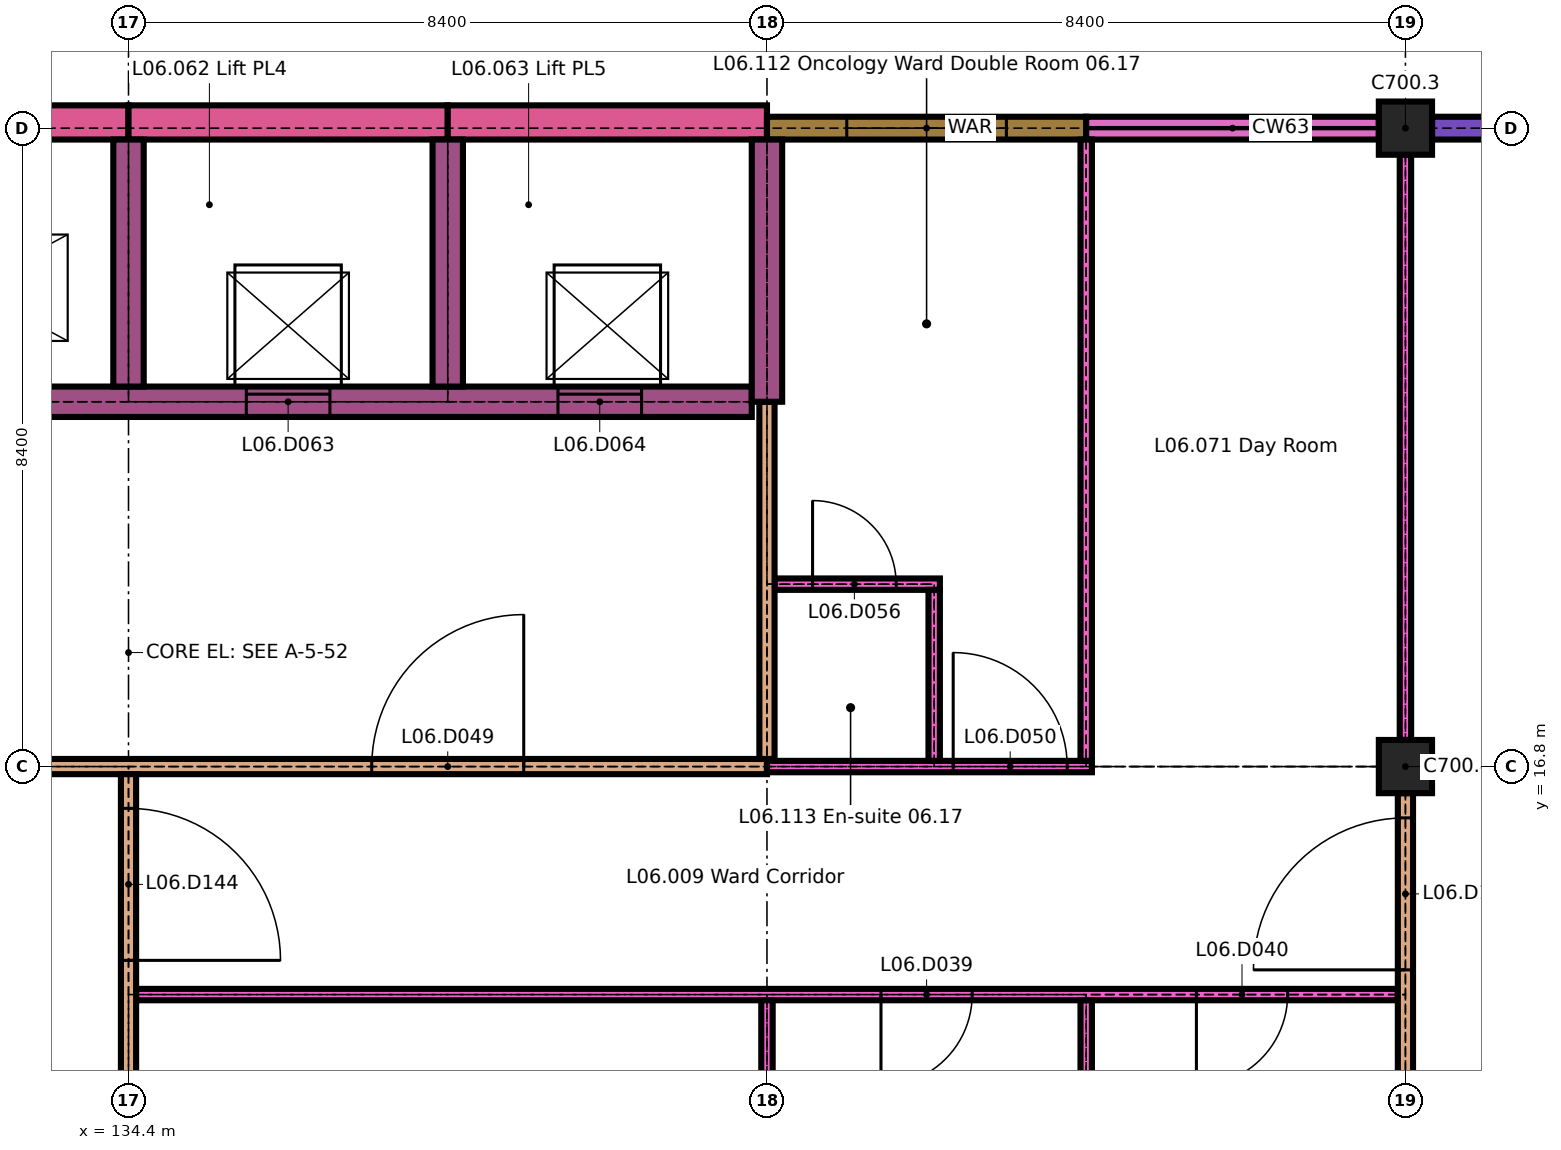
"""IFC4 building model, lengths in metres.
Left out: names, types, materials, properties, quantities, classifications, styles, units other than length and angle.
Written with IfcOpenShell. Run it as: python <this file> out.ifc"""

import sys

from ifc_helpers import new_model, si_unit, direction, frame, frame_2d, origin, origin_2d, place, context, subcontext, project, spatial, rectangle, extrude, element, fill, save


model = new_model("IFC4")
c1 = context("Model", 3, precision=1e-05, world=origin(), true_north=direction((0.0, 1.0)))
c2 = subcontext(c1, "Body", "Model", "MODEL_VIEW")
j1 = project(units=[si_unit("LENGTHUNIT", "METRE"), si_unit("PLANEANGLEUNIT", "RADIAN")], contexts=[c1])
p1 = place(None, origin())
s1 = spatial("IfcSite", under=j1, at=p1, CompositionType="ELEMENT")
p2 = place(p1, origin())
s2 = spatial("IfcBuilding", under=s1, at=p2, CompositionType="ELEMENT")
p3 = place(p2, frame((0.0, 0.0, 26.1)))
s3 = spatial("IfcBuildingStorey", under=s2, at=p3, CompositionType="ELEMENT", Elevation=26.1)
p4 = place(p3, frame((151.2, 16.8, 0.0), z_axis=(0.0, 0.0, 1.0), x_axis=(1.0, 0.0, 0.0)))
e1 = element("IfcColumn", 1, at=p4, inside=s3, PredefinedType="COLUMN", context=c2, shape_type="SweptSolid", body=[
    extrude(rectangle(XDim=0.7, YDim=0.7, at=origin_2d()), origin(), (0.0, 0.0, 1.0), 3.3),
])
p5 = place(p3, frame((151.2, 25.2, 0.0), z_axis=(0.0, 0.0, 1.0), x_axis=(1.0, 0.0, 0.0)))
e2 = element("IfcColumn", 2, at=p5, inside=s3, PredefinedType="COLUMN", context=c2, shape_type="SweptSolid", body=[
    extrude(rectangle(XDim=0.7, YDim=0.7, at=origin_2d()), origin(), (0.0, 0.0, 1.0), 3.2),
])
p6 = place(p3, frame((130.2, 25.275, 0.0), z_axis=(0.0, 0.0, 1.0), x_axis=(1.0, 0.0, 0.0)))
e3 = element("IfcWall", 3, at=p6, inside=s3, PredefinedType="SOLIDWALL", context=c2, shape_type="SweptSolid", body=[
    extrude(rectangle(XDim=4.2, YDim=0.45, at=frame_2d((2.1, 0.0))), origin(), (0.0, 0.0, 1.0), 3.3),
])
p7 = place(p3, frame((134.4, 25.275, 0.0), z_axis=(0.0, 0.0, 1.0), x_axis=(1.0, 0.0, 0.0)))
e4 = element("IfcWall", 4, at=p7, inside=s3, PredefinedType="SOLIDWALL", context=c2, shape_type="SweptSolid", body=[
    extrude(rectangle(XDim=4.2, YDim=0.45, at=frame_2d((2.1, 0.0))), origin(), (0.0, 0.0, 1.0), 3.3),
])
p8 = place(p3, frame((138.6, 25.275, 0.0), z_axis=(0.0, 0.0, 1.0), x_axis=(1.0, 0.0, 0.0)))
e5 = element("IfcWall", 5, at=p8, inside=s3, PredefinedType="SOLIDWALL", context=c2, shape_type="SweptSolid", body=[
    extrude(rectangle(XDim=4.2, YDim=0.45, at=frame_2d((2.1, 0.0))), origin(), (0.0, 0.0, 1.0), 3.3),
])
p9 = place(p3, frame((142.8, 25.2, 0.0), z_axis=(0.0, 0.0, 1.0), x_axis=(1.0, 0.0, 0.0)))
e6 = element("IfcWall", 6, at=p9, inside=s3, PredefinedType="SOLIDWALL", context=c2, shape_type="SweptSolid", body=[
    extrude(rectangle(XDim=4.2, YDim=0.3, at=frame_2d((2.1, 0.0))), origin(), (0.0, 0.0, 1.0), 2.9),
])
p10 = place(p9, frame((1.05, 0.0, 0.9)))
e7 = element("IfcOpeningElement", 7, at=p10, cuts=e6, PredefinedType="OPENING", context=c2, shape_type="SweptSolid", body=[
    extrude(rectangle(XDim=2.1, YDim=1.5, at=frame_2d((1.05, 0.75))), frame((0.0, 0.16, 0.0), z_axis=(0.0, -1.0, 0.0), x_axis=(1.0, 0.0, 0.0)), (0.0, 0.0, 1.0), 0.32),
])
p11 = place(p3, frame((147.0, 25.2, 0.0), z_axis=(0.0, 0.0, 1.0), x_axis=(1.0, 0.0, 0.0)))
e8 = element("IfcWall", 8, at=p11, inside=s3, PredefinedType="SOLIDWALL", context=c2, shape_type="SweptSolid", body=[
    extrude(rectangle(XDim=3.85, YDim=0.3, at=frame_2d((1.925, 0.0))), origin(), (0.0, 0.0, 1.0), 0.6),
])
p12 = place(p3, frame((151.55, 25.2, 0.0), z_axis=(0.0, 0.0, 1.0), x_axis=(1.0, 0.0, 0.0)))
e9 = element("IfcWall", 9, at=p12, inside=s3, PredefinedType="SOLIDWALL", context=c2, shape_type="SweptSolid", body=[
    extrude(rectangle(XDim=1.1, YDim=0.3, at=frame_2d((0.55, 0.0))), origin(), (0.0, 0.0, 1.0), 3.3),
])
p13 = place(p3, frame((134.5, 13.8, 0.0), z_axis=(0.0, 0.0, 1.0), x_axis=(1.0, 0.0, 0.0)))
e10 = element("IfcWall", 10, at=p13, inside=s3, PredefinedType="PARTITIONING", context=c2, shape_type="SweptSolid", body=[
    extrude(rectangle(XDim=16.6, YDim=0.15, at=frame_2d((8.3, 0.0))), origin(), (0.0, 0.0, 1.0), 3.3),
])
p14 = place(p13, frame((9.8, 0.0, 0.0)))
e11 = element("IfcOpeningElement", 11, at=p14, cuts=e10, PredefinedType="OPENING", context=c2, shape_type="SweptSolid", body=[
    extrude(rectangle(XDim=1.2, YDim=2.1, at=frame_2d((0.6, 1.05))), frame((0.0, 0.085, 0.0), z_axis=(0.0, -1.0, 0.0), x_axis=(1.0, 0.0, 0.0)), (0.0, 0.0, 1.0), 0.17),
])
p15 = place(p13, frame((13.95, 0.0, 0.0)))
e12 = element("IfcOpeningElement", 12, at=p15, cuts=e10, PredefinedType="OPENING", context=c2, shape_type="SweptSolid", body=[
    extrude(rectangle(XDim=1.2, YDim=2.1, at=frame_2d((0.6, 1.05))), frame((0.0, 0.085, 0.0), z_axis=(0.0, -1.0, 0.0), x_axis=(1.0, 0.0, 0.0)), (0.0, 0.0, 1.0), 0.17),
])
p16 = place(p3, frame((117.5, 16.8, 0.0), z_axis=(0.0, 0.0, 1.0), x_axis=(1.0, 0.0, 0.0)))
e13 = element("IfcWall", 13, at=p16, inside=s3, PredefinedType="PARTITIONING", context=c2, shape_type="SweptSolid", body=[
    extrude(rectangle(XDim=25.3, YDim=0.2, at=frame_2d((12.65, 0.0))), origin(), (0.0, 0.0, 1.0), 3.3),
])
p17 = place(p16, frame((3.3, 0.0, 0.0)))
e14 = element("IfcOpeningElement", 14, at=p17, cuts=e13, PredefinedType="OPENING", context=c2, shape_type="SweptSolid", body=[
    extrude(rectangle(XDim=2.0, YDim=2.4, at=frame_2d((1.0, 1.2))), frame((0.0, 0.11, 0.0), z_axis=(0.0, -1.0, 0.0), x_axis=(1.0, 0.0, 0.0)), (0.0, 0.0, 1.0), 0.22),
])
p18 = place(p16, frame((20.1, 0.0, 0.0)))
e15 = element("IfcOpeningElement", 15, at=p18, cuts=e13, PredefinedType="OPENING", context=c2, shape_type="SweptSolid", body=[
    extrude(rectangle(XDim=2.0, YDim=2.4, at=frame_2d((1.0, 1.2))), frame((0.0, 0.11, 0.0), z_axis=(0.0, -1.0, 0.0), x_axis=(1.0, 0.0, 0.0)), (0.0, 0.0, 1.0), 0.22),
])
p19 = place(p3, frame((142.8, 16.8, 0.0), z_axis=(0.0, 0.0, 1.0), x_axis=(1.0, 0.0, 0.0)))
e16 = element("IfcWall", 16, at=p19, inside=s3, PredefinedType="PARTITIONING", context=c2, shape_type="SweptSolid", body=[
    extrude(rectangle(XDim=4.275, YDim=0.15, at=frame_2d((2.137, 0.0))), origin(), (0.0, 0.0, 1.0), 3.3),
])
p20 = place(p19, frame((2.45, 0.0, 0.0)))
e17 = element("IfcOpeningElement", 17, at=p20, cuts=e16, PredefinedType="OPENING", context=c2, shape_type="SweptSolid", body=[
    extrude(rectangle(XDim=1.5, YDim=2.4, at=frame_2d((0.75, 1.2))), frame((0.0, 0.085, 0.0), z_axis=(0.0, -1.0, 0.0), x_axis=(1.0, 0.0, 0.0)), (0.0, 0.0, 1.0), 0.17),
])
p21 = place(p3, frame((142.9, 19.2, 0.0), z_axis=(0.0, 0.0, 1.0), x_axis=(1.0, 0.0, 0.0)))
e18 = element("IfcWall", 18, at=p21, inside=s3, PredefinedType="PARTITIONING", context=c2, shape_type="SweptSolid", body=[
    extrude(rectangle(XDim=2.175, YDim=0.15, at=frame_2d((1.087, 0.0))), origin(), (0.0, 0.0, 1.0), 3.3),
])
p22 = place(p21, frame((0.5, 0.0, 0.0)))
e19 = element("IfcOpeningElement", 19, at=p22, cuts=e18, PredefinedType="OPENING", context=c2, shape_type="SweptSolid", body=[
    extrude(rectangle(XDim=1.1, YDim=2.1, at=frame_2d((0.55, 1.05))), frame((0.0, 0.085, 0.0), z_axis=(0.0, -1.0, 0.0), x_axis=(1.0, 0.0, 0.0)), (0.0, 0.0, 1.0), 0.17),
])
p23 = place(p3, frame((117.8, 21.6, 0.0), z_axis=(0.0, 0.0, 1.0), x_axis=(1.0, 0.0, 0.0)))
e20 = element("IfcWall", 20, at=p23, inside=s3, PredefinedType="SHEAR", context=c2, shape_type="SweptSolid", body=[
    extrude(rectangle(XDim=24.8, YDim=0.4, at=frame_2d((12.4, 0.0))), origin(), (0.0, 0.0, 1.0), 3.3),
])
p24 = place(p23, frame((1.35, 0.0, 0.0)))
e21 = element("IfcOpeningElement", 21, at=p24, cuts=e20, PredefinedType="OPENING", context=c2, shape_type="SweptSolid", body=[
    extrude(rectangle(XDim=1.3, YDim=2.1, at=frame_2d((0.65, 1.05))), frame((0.0, 0.21, 0.0), z_axis=(0.0, -1.0, 0.0), x_axis=(1.0, 0.0, 0.0)), (0.0, 0.0, 1.0), 0.42),
])
p25 = place(p23, frame((5.45, 0.0, 0.0)))
e22 = element("IfcOpeningElement", 22, at=p25, cuts=e20, PredefinedType="OPENING", context=c2, shape_type="SweptSolid", body=[
    extrude(rectangle(XDim=1.3, YDim=2.1, at=frame_2d((0.65, 1.05))), frame((0.0, 0.21, 0.0), z_axis=(0.0, -1.0, 0.0), x_axis=(1.0, 0.0, 0.0)), (0.0, 0.0, 1.0), 0.42),
])
p26 = place(p23, frame((9.65, 0.0, 0.0)))
e23 = element("IfcOpeningElement", 23, at=p26, cuts=e20, PredefinedType="OPENING", context=c2, shape_type="SweptSolid", body=[
    extrude(rectangle(XDim=1.3, YDim=2.1, at=frame_2d((0.65, 1.05))), frame((0.0, 0.21, 0.0), z_axis=(0.0, -1.0, 0.0), x_axis=(1.0, 0.0, 0.0)), (0.0, 0.0, 1.0), 0.42),
])
p27 = place(p23, frame((13.85, 0.0, 0.0)))
e24 = element("IfcOpeningElement", 24, at=p27, cuts=e20, PredefinedType="OPENING", context=c2, shape_type="SweptSolid", body=[
    extrude(rectangle(XDim=1.3, YDim=2.1, at=frame_2d((0.65, 1.05))), frame((0.0, 0.21, 0.0), z_axis=(0.0, -1.0, 0.0), x_axis=(1.0, 0.0, 0.0)), (0.0, 0.0, 1.0), 0.42),
])
p28 = place(p23, frame((18.15, 0.0, 0.0)))
e25 = element("IfcOpeningElement", 25, at=p28, cuts=e20, PredefinedType="OPENING", context=c2, shape_type="SweptSolid", body=[
    extrude(rectangle(XDim=1.1, YDim=2.1, at=frame_2d((0.55, 1.05))), frame((0.0, 0.21, 0.0), z_axis=(0.0, -1.0, 0.0), x_axis=(1.0, 0.0, 0.0)), (0.0, 0.0, 1.0), 0.42),
])
p29 = place(p23, frame((22.25, 0.0, 0.0)))
e26 = element("IfcOpeningElement", 26, at=p29, cuts=e20, PredefinedType="OPENING", context=c2, shape_type="SweptSolid", body=[
    extrude(rectangle(XDim=1.1, YDim=2.1, at=frame_2d((0.55, 1.05))), frame((0.0, 0.21, 0.0), z_axis=(0.0, -1.0, 0.0), x_axis=(1.0, 0.0, 0.0)), (0.0, 0.0, 1.0), 0.42),
])
p30 = place(p3, frame((134.4, 3.6, 0.0), z_axis=(0.0, 0.0, 1.0), x_axis=(0.0, 1.0, 0.0)))
e27 = element("IfcWall", 27, at=p30, inside=s3, PredefinedType="PARTITIONING", context=c2, shape_type="SweptSolid", body=[
    extrude(rectangle(XDim=13.1, YDim=0.2, at=frame_2d((6.55, 0.0))), origin(), (0.0, 0.0, 1.0), 3.3),
])
p31 = place(p30, frame((5.3, 0.0, 0.0)))
e28 = element("IfcOpeningElement", 28, at=p31, cuts=e27, PredefinedType="OPENING", context=c2, shape_type="SweptSolid", body=[
    extrude(rectangle(XDim=2.0, YDim=2.4, at=frame_2d((1.0, 1.2))), frame((0.0, 0.11, 0.0), z_axis=(0.0, -1.0, 0.0), x_axis=(1.0, 0.0, 0.0)), (0.0, 0.0, 1.0), 0.22),
])
p32 = place(p30, frame((10.65, 0.0, 0.0)))
e29 = element("IfcOpeningElement", 29, at=p32, cuts=e27, PredefinedType="OPENING", context=c2, shape_type="SweptSolid", body=[
    extrude(rectangle(XDim=2.0, YDim=2.4, at=frame_2d((1.0, 1.2))), frame((0.0, 0.11, 0.0), z_axis=(0.0, -1.0, 0.0), x_axis=(1.0, 0.0, 0.0)), (0.0, 0.0, 1.0), 0.22),
])
for number, where, z_axis, x_axis in (
    (30, (134.4, 21.8, 0.0), (0.0, 0.0, 1.0), (0.0, 1.0, 0.0)),
    (31, (138.6, 21.8, 0.0), (0.0, 0.0, 1.0), (0.0, 1.0, 0.0)),
):
    element("IfcWall", number, at=place(p3, frame(where, z_axis=z_axis, x_axis=x_axis)), inside=s3, PredefinedType="SHEAR", context=c2, shape_type="SweptSolid", body=[
        extrude(rectangle(XDim=3.25, YDim=0.4, at=frame_2d((1.625, 0.0))), origin(), (0.0, 0.0, 1.0), 3.3),
    ])
p33 = place(p3, frame((142.8, 11.475, 0.0), z_axis=(0.0, 0.0, 1.0), x_axis=(0.0, 1.0, 0.0)))
e32 = element("IfcWall", 32, at=p33, inside=s3, PredefinedType="PARTITIONING", context=c2, shape_type="SweptSolid", body=[
    extrude(rectangle(XDim=2.25, YDim=0.15, at=frame_2d((1.125, 0.0))), origin(), (0.0, 0.0, 1.0), 3.3),
])
p34 = place(p3, frame((142.8, 16.9, 0.0), z_axis=(0.0, 0.0, 1.0), x_axis=(0.0, 1.0, 0.0)))
e33 = element("IfcWall", 33, at=p34, inside=s3, PredefinedType="PARTITIONING", context=c2, shape_type="SweptSolid", body=[
    extrude(rectangle(XDim=4.7, YDim=0.2, at=frame_2d((2.35, 0.0))), origin(), (0.0, 0.0, 1.0), 3.3),
])
p35 = place(p3, frame((142.8, 21.6, 0.0), z_axis=(0.0, 0.0, 1.0), x_axis=(0.0, 1.0, 0.0)))
e34 = element("IfcWall", 34, at=p35, inside=s3, PredefinedType="SHEAR", context=c2, shape_type="SweptSolid", body=[
    extrude(rectangle(XDim=3.45, YDim=0.4, at=frame_2d((1.725, 0.0))), origin(), (0.0, 0.0, 1.0), 3.3),
])
for number, where, z_axis, x_axis in (
    (35, (145.0, 16.875, 0.0), (0.0, 0.0, 1.0), (0.0, 1.0, 0.0)),
    (36, (147.0, 11.475, 0.0), (0.0, 0.0, 1.0), (0.0, 1.0, 0.0)),
):
    element("IfcWall", number, at=place(p3, frame(where, z_axis=z_axis, x_axis=x_axis)), inside=s3, PredefinedType="PARTITIONING", context=c2, shape_type="SweptSolid", body=[
        extrude(rectangle(XDim=2.25, YDim=0.15, at=frame_2d((1.125, 0.0))), origin(), (0.0, 0.0, 1.0), 3.3),
    ])
p36 = place(p3, frame((147.0, 16.875, 0.0), z_axis=(0.0, 0.0, 1.0), x_axis=(0.0, 1.0, 0.0)))
e37 = element("IfcWall", 37, at=p36, inside=s3, PredefinedType="PARTITIONING", context=c2, shape_type="SweptSolid", body=[
    extrude(rectangle(XDim=8.175, YDim=0.15, at=frame_2d((4.087, 0.0))), origin(), (0.0, 0.0, 1.0), 3.3),
])
p37 = place(p3, frame((151.2, 8.75, 0.0), z_axis=(0.0, 0.0, 1.0), x_axis=(0.0, 1.0, 0.0)))
e38 = element("IfcWall", 38, at=p37, inside=s3, PredefinedType="PARTITIONING", context=c2, shape_type="SweptSolid", body=[
    extrude(rectangle(XDim=7.7, YDim=0.2, at=frame_2d((3.85, 0.0))), origin(), (0.0, 0.0, 1.0), 3.3),
])
p38 = place(p37, frame((0.325, 0.0, 0.0)))
e39 = element("IfcOpeningElement", 39, at=p38, cuts=e38, PredefinedType="OPENING", context=c2, shape_type="SweptSolid", body=[
    extrude(rectangle(XDim=2.0, YDim=2.4, at=frame_2d((1.0, 1.2))), frame((0.0, 0.11, 0.0), z_axis=(0.0, -1.0, 0.0), x_axis=(1.0, 0.0, 0.0)), (0.0, 0.0, 1.0), 0.22),
])
p39 = place(p37, frame((5.375, 0.0, 0.0)))
e40 = element("IfcOpeningElement", 40, at=p39, cuts=e38, PredefinedType="OPENING", context=c2, shape_type="SweptSolid", body=[
    extrude(rectangle(XDim=2.0, YDim=2.4, at=frame_2d((1.0, 1.2))), frame((0.0, 0.11, 0.0), z_axis=(0.0, -1.0, 0.0), x_axis=(1.0, 0.0, 0.0)), (0.0, 0.0, 1.0), 0.22),
])
p40 = place(p3, frame((151.2, 17.15, 0.0), z_axis=(0.0, 0.0, 1.0), x_axis=(0.0, 1.0, 0.0)))
e41 = element("IfcWall", 41, at=p40, inside=s3, PredefinedType="PARTITIONING", context=c2, shape_type="SweptSolid", body=[
    extrude(rectangle(XDim=7.7, YDim=0.15, at=frame_2d((3.85, 0.0))), origin(), (0.0, 0.0, 1.0), 3.3),
])
p41 = place(p10, origin())
e42 = element("IfcWindow", 42, at=p41, inside=s3, PartitioningType="DOUBLE_PANEL_VERTICAL", PredefinedType="WINDOW", context=c2, shape_type="SweptSolid", body=[
    extrude(rectangle(XDim=2.1, YDim=1.5, at=frame_2d((1.05, 0.75))), frame((0.0, 0.05, 0.0), z_axis=(0.0, -1.0, 0.0), x_axis=(1.0, 0.0, 0.0)), (0.0, 0.0, 1.0), 0.1),
])
fill(e7, e42)
p42 = place(p14, origin())
e43 = element("IfcDoor", 43, at=p42, inside=s3, OperationType="SINGLE_SWING_LEFT", PredefinedType="DOOR", context=c2, shape_type="SweptSolid", body=[
    extrude(rectangle(XDim=1.2, YDim=2.1, at=frame_2d((0.6, 1.05))), frame((0.0, 0.025, 0.0), z_axis=(0.0, -1.0, 0.0), x_axis=(1.0, 0.0, 0.0)), (0.0, 0.0, 1.0), 0.05),
])
fill(e11, e43)
p43 = place(p15, origin())
e44 = element("IfcDoor", 44, at=p43, inside=s3, OperationType="SINGLE_SWING_LEFT", PredefinedType="DOOR", context=c2, shape_type="SweptSolid", body=[
    extrude(rectangle(XDim=1.2, YDim=2.1, at=frame_2d((0.6, 1.05))), frame((0.0, 0.025, 0.0), z_axis=(0.0, -1.0, 0.0), x_axis=(1.0, 0.0, 0.0)), (0.0, 0.0, 1.0), 0.05),
])
fill(e12, e44)
p44 = place(p18, origin())
e45 = element("IfcDoor", 45, at=p44, inside=s3, OperationType="SINGLE_SWING_LEFT", PredefinedType="DOOR", context=c2, shape_type="SweptSolid", body=[
    extrude(rectangle(XDim=2.0, YDim=2.4, at=frame_2d((1.0, 1.2))), frame((0.0, 0.03, 0.0), z_axis=(0.0, -1.0, 0.0), x_axis=(1.0, 0.0, 0.0)), (0.0, 0.0, 1.0), 0.06),
])
fill(e15, e45)
p45 = place(p20, origin())
e46 = element("IfcDoor", 46, at=p45, inside=s3, OperationType="SINGLE_SWING_RIGHT", PredefinedType="DOOR", context=c2, shape_type="SweptSolid", body=[
    extrude(rectangle(XDim=1.5, YDim=2.4, at=frame_2d((0.75, 1.2))), frame((0.0, 0.03, 0.0), z_axis=(0.0, -1.0, 0.0), x_axis=(1.0, 0.0, 0.0)), (0.0, 0.0, 1.0), 0.06),
])
fill(e17, e46)
p46 = place(p22, origin())
e47 = element("IfcDoor", 47, at=p46, inside=s3, OperationType="SINGLE_SWING_RIGHT", PredefinedType="DOOR", context=c2, shape_type="SweptSolid", body=[
    extrude(rectangle(XDim=1.1, YDim=2.1, at=frame_2d((0.55, 1.05))), frame((0.0, 0.025, 0.0), z_axis=(0.0, -1.0, 0.0), x_axis=(1.0, 0.0, 0.0)), (0.0, 0.0, 1.0), 0.05),
])
fill(e19, e47)
p47 = place(p28, origin())
e48 = element("IfcDoor", 48, at=p47, inside=s3, OperationType="SLIDING_TO_LEFT", PredefinedType="DOOR", context=c2, shape_type="SweptSolid", body=[
    extrude(rectangle(XDim=1.1, YDim=2.1, at=frame_2d((0.55, 1.05))), frame((0.0, 0.025, 0.0), z_axis=(0.0, -1.0, 0.0), x_axis=(1.0, 0.0, 0.0)), (0.0, 0.0, 1.0), 0.05),
])
fill(e25, e48)
p48 = place(p29, origin())
e49 = element("IfcDoor", 49, at=p48, inside=s3, OperationType="SLIDING_TO_LEFT", PredefinedType="DOOR", context=c2, shape_type="SweptSolid", body=[
    extrude(rectangle(XDim=1.1, YDim=2.1, at=frame_2d((0.55, 1.05))), frame((0.0, 0.025, 0.0), z_axis=(0.0, -1.0, 0.0), x_axis=(1.0, 0.0, 0.0)), (0.0, 0.0, 1.0), 0.05),
])
fill(e26, e49)
p49 = place(p32, origin())
e50 = element("IfcDoor", 50, at=p49, inside=s3, OperationType="SINGLE_SWING_LEFT", PredefinedType="DOOR", context=c2, shape_type="SweptSolid", body=[
    extrude(rectangle(XDim=2.0, YDim=2.4, at=frame_2d((1.0, 1.2))), frame((0.0, 0.03, 0.0), z_axis=(0.0, -1.0, 0.0), x_axis=(1.0, 0.0, 0.0)), (0.0, 0.0, 1.0), 0.06),
])
fill(e29, e50)
p50 = place(p39, origin())
e51 = element("IfcDoor", 51, at=p50, inside=s3, OperationType="SINGLE_SWING_RIGHT", PredefinedType="DOOR", context=c2, shape_type="SweptSolid", body=[
    extrude(rectangle(XDim=2.0, YDim=2.4, at=frame_2d((1.0, 1.2))), frame((0.0, 0.03, 0.0), z_axis=(0.0, -1.0, 0.0), x_axis=(1.0, 0.0, 0.0)), (0.0, 0.0, 1.0), 0.06),
])
fill(e40, e51)
save(model, sys.argv[1])
